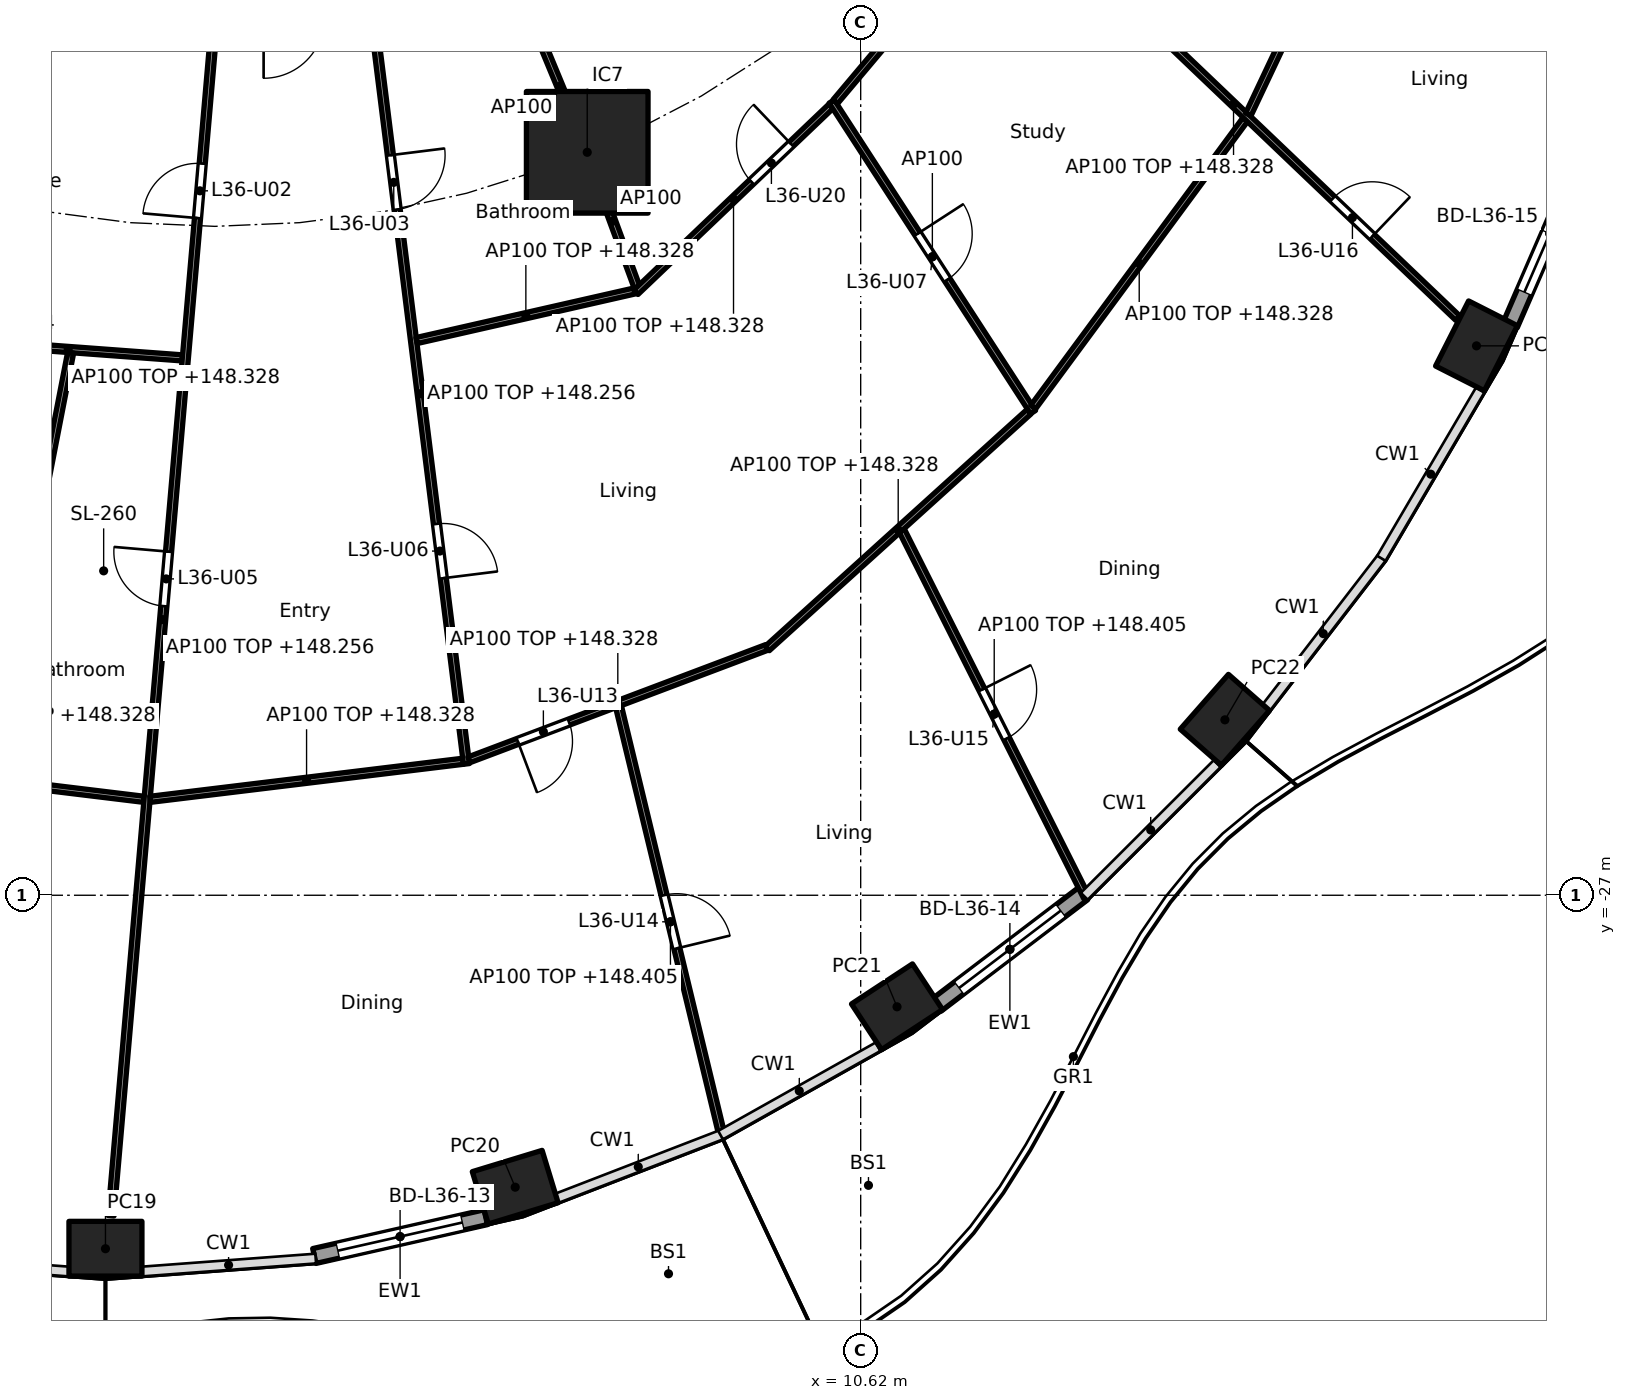
"""IFC4 building model, lengths in metres.
Left out: names, types, materials, properties, quantities, classifications, styles, units other than length and angle.
Written with IfcOpenShell. Run it as: python <this file> out.ifc"""

import sys

from ifc_helpers import new_model, si_unit, direction, frame, frame_2d, origin, origin_2d, place, context, subcontext, project, spatial, rectangle, hollow_rectangle, extrude, element, fill, save


model = new_model("IFC4")
c1 = context("Model", 3, precision=1e-05, world=origin(), true_north=direction((0.0, 1.0)))
c2 = subcontext(c1, "Body", "Model", "MODEL_VIEW")
j1 = project(units=[si_unit("LENGTHUNIT", "METRE"), si_unit("PLANEANGLEUNIT", "RADIAN")], contexts=[c1])
p1 = place(None, origin())
s1 = spatial("IfcSite", under=j1, at=p1, CompositionType="ELEMENT")
p2 = place(p1, origin())
s2 = spatial("IfcBuilding", under=s1, at=p2, CompositionType="ELEMENT")
p3 = place(p2, frame((0.0, 0.0, 145.5)))
s3 = spatial("IfcBuildingStorey", under=s2, at=p3, CompositionType="ELEMENT", Elevation=145.5)
for number, where, z_axis, x_axis in (
    (1, (-1.8, -32.813, 0.0), (0.0, 0.0, 1.0), (1.0, 0.0, 0.0)),
    (2, (4.938, -31.801, 0.0), (0.0, 0.0, 1.0), (0.957, 0.292, 0.0)),
    (3, (11.218, -28.834, 0.0), (0.0, 0.0, 1.0), (0.836, 0.549, 0.0)),
    (4, (16.61, -24.115, 0.0), (0.0, 0.0, 1.0), (0.66, 0.751, 0.0)),
    (5, (20.747, -17.965, 0.0), (0.0, 0.0, 1.0), (0.452, 0.892, 0.0)),
):
    element("IfcColumn", number, at=place(p3, frame(where, z_axis=z_axis, x_axis=x_axis)), inside=s3, PredefinedType="COLUMN", context=c2, shape_type="SweptSolid", body=[
        extrude(hollow_rectangle(XDim=1.2, YDim=0.9, WallThickness=0.04, at=origin_2d()), origin(), (0.0, 0.0, 1.0), 3.7),
    ])
p4 = place(p3, frame((6.123, -14.782, 0.0), z_axis=(0.0, 0.0, 1.0), x_axis=(1.0, 0.0, 0.0)))
e6 = element("IfcColumn", 6, at=p4, inside=s3, PredefinedType="COLUMN", context=c2, shape_type="SweptSolid", body=[
    extrude(rectangle(XDim=2.0, YDim=2.0, at=origin_2d()), origin(), (0.0, 0.0, 1.0), 3.7),
])
p5 = place(p3, frame((4.455, -32.294, 0.0), z_axis=(0.0, 0.0, 1.0), x_axis=(-0.975339035722, -0.220711951186, 0.0)))
e7 = element("IfcWall", 7, at=p5, inside=s3, PredefinedType="SOLIDWALL", context=c2, shape_type="SweptSolid", body=[
    extrude(rectangle(XDim=2.89, YDim=0.25, at=frame_2d((1.445, 0.0))), origin(), (0.0, 0.0, 1.0), 3.44),
])
p6 = place(p5, frame((0.395, 0.0, 0.0)))
e8 = element("IfcOpeningElement", 8, at=p6, cuts=e7, PredefinedType="OPENING", context=c2, shape_type="SweptSolid", body=[
    extrude(rectangle(XDim=2.1, YDim=2.4, at=frame_2d((1.05, 1.2))), frame((0.0, 0.135, 0.0), z_axis=(0.0, -1.0, 0.0), x_axis=(1.0, 0.0, 0.0)), (0.0, 0.0, 1.0), 0.27),
])
p7 = place(p3, frame((14.278, -26.973, 0.0), z_axis=(0.0, 0.0, 1.0), x_axis=(-0.796022231079, -0.605267385233, 0.0)))
e9 = element("IfcWall", 9, at=p7, inside=s3, PredefinedType="SOLIDWALL", context=c2, shape_type="SweptSolid", body=[
    extrude(rectangle(XDim=3.026, YDim=0.25, at=frame_2d((1.513, 0.0))), origin(), (0.0, 0.0, 1.0), 3.44),
])
p8 = place(p7, frame((0.463, 0.0, 0.0)))
e10 = element("IfcOpeningElement", 10, at=p8, cuts=e9, PredefinedType="OPENING", context=c2, shape_type="SweptSolid", body=[
    extrude(rectangle(XDim=2.1, YDim=2.4, at=frame_2d((1.05, 1.2))), frame((0.0, 0.135, 0.0), z_axis=(0.0, -1.0, 0.0), x_axis=(1.0, 0.0, 0.0)), (0.0, 0.0, 1.0), 0.27),
])
p9 = place(p3, frame((22.6, -14.623, 0.0), z_axis=(0.0, 0.0, 1.0), x_axis=(-0.397575919276, -0.917569282622, 0.0)))
e11 = element("IfcWall", 11, at=p9, inside=s3, PredefinedType="SOLIDWALL", context=c2, shape_type="SweptSolid", body=[
    extrude(rectangle(XDim=3.261, YDim=0.25, at=frame_2d((1.63, 0.0))), origin(), (0.0, 0.0, 1.0), 3.44),
])
p10 = place(p9, frame((0.58, 0.0, 0.0)))
e12 = element("IfcOpeningElement", 12, at=p10, cuts=e11, PredefinedType="OPENING", context=c2, shape_type="SweptSolid", body=[
    extrude(rectangle(XDim=2.1, YDim=2.4, at=frame_2d((1.05, 1.2))), frame((0.0, 0.135, 0.0), z_axis=(0.0, -1.0, 0.0), x_axis=(1.0, 0.0, 0.0)), (0.0, 0.0, 1.0), 0.27),
])
p11 = place(p3, frame((-4.29, -17.885, 0.0), z_axis=(0.0, 0.0, 1.0), x_axis=(0.997272353708, -0.073809569363, 0.0)))
e13 = element("IfcWall", 13, at=p11, inside=s3, PredefinedType="PARTITIONING", context=c2, shape_type="SweptSolid", body=[
    extrude(rectangle(XDim=3.764, YDim=0.1, at=frame_2d((1.882, 0.0))), origin(), (0.0, 0.0, 1.0), 2.828),
])
p12 = place(p11, frame((0.541, 0.0, 0.0)))
e14 = element("IfcOpeningElement", 14, at=p12, cuts=e13, PredefinedType="OPENING", context=c2, shape_type="SweptSolid", body=[
    extrude(rectangle(XDim=0.9, YDim=2.1, at=frame_2d((0.45, 1.05))), frame((0.0, 0.06, 0.0), z_axis=(0.0, -1.0, 0.0), x_axis=(1.0, 0.0, 0.0)), (0.0, 0.0, 1.0), 0.12),
])
p13 = place(p3, frame((-6.313, -24.797, 0.0), z_axis=(0.0, 0.0, 1.0), x_axis=(0.992692993044, -0.120667400577, 0.0)))
e15 = element("IfcWall", 15, at=p13, inside=s3, PredefinedType="PARTITIONING", context=c2, shape_type="SweptSolid", body=[
    extrude(rectangle(XDim=5.186, YDim=0.1, at=frame_2d((2.593, 0.0))), origin(), (0.0, 0.0, 1.0), 2.828),
])
p14 = place(p3, frame((-2.373, -18.077, 0.0), z_axis=(0.0, 0.0, 1.0), x_axis=(-0.190800770119, -0.98162878224, 0.0)))
e16 = element("IfcWall", 16, at=p14, inside=s3, PredefinedType="PARTITIONING", context=c2, shape_type="SweptSolid", body=[
    extrude(rectangle(XDim=7.114, YDim=0.1, at=frame_2d((3.557, 0.0))), origin(), (0.0, 0.0, 1.0), 3.44),
])
p15 = place(p3, frame((-0.009, -12.664, 0.0), z_axis=(0.0, 0.0, 1.0), x_axis=(-0.086431005932, -0.996257838721, 0.0)))
e17 = element("IfcWall", 17, at=p15, inside=s3, PredefinedType="PARTITIONING", context=c2, shape_type="SweptSolid", body=[
    extrude(rectangle(XDim=19.68, YDim=0.1, at=frame_2d((9.84, 0.0))), origin(), (0.0, 0.0, 1.0), 2.756),
])
p16 = place(p15, frame((2.312, 0.0, 0.0)))
e18 = element("IfcOpeningElement", 18, at=p16, cuts=e17, PredefinedType="OPENING", context=c2, shape_type="SweptSolid", body=[
    extrude(rectangle(XDim=0.9, YDim=2.1, at=frame_2d((0.45, 1.05))), frame((0.0, 0.06, 0.0), z_axis=(0.0, -1.0, 0.0), x_axis=(1.0, 0.0, 0.0)), (0.0, 0.0, 1.0), 0.12),
])
p17 = place(p15, frame((8.718, 0.0, 0.0)))
e19 = element("IfcOpeningElement", 19, at=p17, cuts=e17, PredefinedType="OPENING", context=c2, shape_type="SweptSolid", body=[
    extrude(rectangle(XDim=0.9, YDim=2.1, at=frame_2d((0.45, 1.05))), frame((0.0, 0.06, 0.0), z_axis=(0.0, -1.0, 0.0), x_axis=(1.0, 0.0, 0.0)), (0.0, 0.0, 1.0), 0.12),
])
p18 = place(p3, frame((-1.066, -25.422, 0.0), z_axis=(0.0, 0.0, 1.0), x_axis=(0.992692993044, 0.120667400577, 0.0)))
e20 = element("IfcWall", 20, at=p18, inside=s3, PredefinedType="PARTITIONING", context=c2, shape_type="SweptSolid", body=[
    extrude(rectangle(XDim=5.186, YDim=0.1, at=frame_2d((2.593, 0.0))), origin(), (0.0, 0.0, 1.0), 2.828),
])
p19 = place(p3, frame((2.615, -12.664, 0.0), z_axis=(0.0, 0.0, 1.0), x_axis=(0.124051875784, -0.992275733914, 0.0)))
e21 = element("IfcWall", 21, at=p19, inside=s3, PredefinedType="PARTITIONING", context=c2, shape_type="SweptSolid", body=[
    extrude(rectangle(XDim=12.271, YDim=0.1, at=frame_2d((6.135, 0.0))), origin(), (0.0, 0.0, 1.0), 2.756),
])
p20 = place(p19, frame((2.183, 0.0, 0.0)))
e22 = element("IfcOpeningElement", 22, at=p20, cuts=e21, PredefinedType="OPENING", context=c2, shape_type="SweptSolid", body=[
    extrude(rectangle(XDim=0.9, YDim=2.1, at=frame_2d((0.45, 1.05))), frame((0.0, 0.06, 0.0), z_axis=(0.0, -1.0, 0.0), x_axis=(1.0, 0.0, 0.0)), (0.0, 0.0, 1.0), 0.12),
])
p21 = place(p19, frame((8.293, 0.0, 0.0)))
e23 = element("IfcOpeningElement", 23, at=p21, cuts=e21, PredefinedType="OPENING", context=c2, shape_type="SweptSolid", body=[
    extrude(rectangle(XDim=0.9, YDim=2.1, at=frame_2d((0.45, 1.05))), frame((0.0, 0.06, 0.0), z_axis=(0.0, -1.0, 0.0), x_axis=(1.0, 0.0, 0.0)), (0.0, 0.0, 1.0), 0.12),
])
p22 = place(p3, frame((3.317, -17.878, 0.0), z_axis=(0.0, 0.0, 1.0), x_axis=(0.975099660451, 0.221767112505, 0.0)))
e24 = element("IfcWall", 24, at=p22, inside=s3, PredefinedType="PARTITIONING", context=c2, shape_type="SweptSolid", body=[
    extrude(rectangle(XDim=3.686, YDim=0.1, at=frame_2d((1.843, 0.0))), origin(), (0.0, 0.0, 1.0), 2.828),
])
p23 = place(p3, frame((4.178, -24.773, 0.0), z_axis=(0.0, 0.0, 1.0), x_axis=(0.935585145124, 0.353101169955, 0.0)))
e25 = element("IfcWall", 25, at=p23, inside=s3, PredefinedType="PARTITIONING", context=c2, shape_type="SweptSolid", body=[
    extrude(rectangle(XDim=5.233, YDim=0.1, at=frame_2d((2.617, 0.0))), origin(), (0.0, 0.0, 1.0), 2.828),
])
p24 = place(p23, frame((0.858, 0.0, 0.0)))
e26 = element("IfcOpeningElement", 26, at=p24, cuts=e25, PredefinedType="OPENING", context=c2, shape_type="SweptSolid", body=[
    extrude(rectangle(XDim=0.9, YDim=2.1, at=frame_2d((0.45, 1.05))), frame((0.0, 0.06, 0.0), z_axis=(0.0, -1.0, 0.0), x_axis=(1.0, 0.0, 0.0)), (0.0, 0.0, 1.0), 0.12),
])
p25 = place(p3, frame((6.638, -23.897, 0.0), z_axis=(0.0, 0.0, 1.0), x_axis=(0.23451925277, -0.97211147513, 0.0)))
e27 = element("IfcWall", 27, at=p25, inside=s3, PredefinedType="PARTITIONING", context=c2, shape_type="SweptSolid", body=[
    extrude(rectangle(XDim=7.281, YDim=0.1, at=frame_2d((3.641, 0.0))), origin(), (0.0, 0.0, 1.0), 2.905),
])
p26 = place(p25, frame((3.19, 0.0, 0.0)))
e28 = element("IfcOpeningElement", 28, at=p26, cuts=e27, PredefinedType="OPENING", context=c2, shape_type="SweptSolid", body=[
    extrude(rectangle(XDim=0.9, YDim=2.1, at=frame_2d((0.45, 1.05))), frame((0.0, 0.06, 0.0), z_axis=(0.0, -1.0, 0.0), x_axis=(1.0, 0.0, 0.0)), (0.0, 0.0, 1.0), 0.12),
])
p27 = place(p3, frame((5.243, -12.657, 0.0), z_axis=(0.0, 0.0, 1.0), x_axis=(0.382703272338, -0.923871314276, 0.0)))
e29 = element("IfcWall", 29, at=p27, inside=s3, PredefinedType="PARTITIONING", context=c2, shape_type="SweptSolid", body=[
    extrude(rectangle(XDim=2.249, YDim=0.1, at=frame_2d((1.125, 0.0))), origin(), (0.0, 0.0, 1.0), 3.44),
])
p28 = place(p3, frame((6.14, -14.829, 0.0), z_axis=(0.0, 0.0, 1.0), x_axis=(0.346198576881, -0.938161257655, 0.0)))
e30 = element("IfcWall", 30, at=p28, inside=s3, PredefinedType="PARTITIONING", context=c2, shape_type="SweptSolid", body=[
    extrude(rectangle(XDim=2.317, YDim=0.1, at=frame_2d((1.158, 0.0))), origin(), (0.0, 0.0, 1.0), 3.44),
])
p29 = place(p3, frame((6.923, -17.084, 0.0), z_axis=(0.0, 0.0, 1.0), x_axis=(0.723719008606, 0.690094773623, 0.0)))
e31 = element("IfcWall", 31, at=p29, inside=s3, PredefinedType="PARTITIONING", context=c2, shape_type="SweptSolid", body=[
    extrude(rectangle(XDim=4.436, YDim=0.1, at=frame_2d((2.218, 0.0))), origin(), (0.0, 0.0, 1.0), 2.828),
])
p30 = place(p29, frame((2.629, 0.0, 0.0)))
e32 = element("IfcOpeningElement", 32, at=p30, cuts=e31, PredefinedType="OPENING", context=c2, shape_type="SweptSolid", body=[
    extrude(rectangle(XDim=0.9, YDim=2.1, at=frame_2d((0.45, 1.05))), frame((0.0, 0.06, 0.0), z_axis=(0.0, -1.0, 0.0), x_axis=(1.0, 0.0, 0.0)), (0.0, 0.0, 1.0), 0.12),
])
p31 = place(p3, frame((9.084, -22.941, 0.0), z_axis=(0.0, 0.0, 1.0), x_axis=(0.741684187175, 0.670749257543, 0.0)))
e33 = element("IfcWall", 33, at=p31, inside=s3, PredefinedType="PARTITIONING", context=c2, shape_type="SweptSolid", body=[
    extrude(rectangle(XDim=5.806, YDim=0.1, at=frame_2d((2.903, 0.0))), origin(), (0.0, 0.0, 1.0), 2.828),
])
p32 = place(p3, frame((11.296, -21.005, 0.0), z_axis=(0.0, 0.0, 1.0), x_axis=(0.44991509116, -0.893071335755, 0.0)))
e34 = element("IfcWall", 34, at=p32, inside=s3, PredefinedType="PARTITIONING", context=c2, shape_type="SweptSolid", body=[
    extrude(rectangle(XDim=6.755, YDim=0.1, at=frame_2d((3.377, 0.0))), origin(), (0.0, 0.0, 1.0), 2.905),
])
p33 = place(p32, frame((2.927, 0.0, 0.0)))
e35 = element("IfcOpeningElement", 35, at=p33, cuts=e34, PredefinedType="OPENING", context=c2, shape_type="SweptSolid", body=[
    extrude(rectangle(XDim=0.9, YDim=2.1, at=frame_2d((0.45, 1.05))), frame((0.0, 0.06, 0.0), z_axis=(0.0, -1.0, 0.0), x_axis=(1.0, 0.0, 0.0)), (0.0, 0.0, 1.0), 0.12),
])
p34 = place(p3, frame((10.143, -13.946, 0.0), z_axis=(0.0, 0.0, 1.0), x_axis=(0.543872968754, -0.839167560061, 0.0)))
e36 = element("IfcWall", 36, at=p34, inside=s3, PredefinedType="PARTITIONING", context=c2, shape_type="SweptSolid", body=[
    extrude(rectangle(XDim=6.088, YDim=0.1, at=frame_2d((3.044, 0.0))), origin(), (0.0, 0.0, 1.0), 3.44),
])
p35 = place(p34, frame((2.594, 0.0, 0.0)))
e37 = element("IfcOpeningElement", 37, at=p35, cuts=e36, PredefinedType="OPENING", context=c2, shape_type="SweptSolid", body=[
    extrude(rectangle(XDim=0.9, YDim=2.1, at=frame_2d((0.45, 1.05))), frame((0.0, 0.06, 0.0), z_axis=(0.0, -1.0, 0.0), x_axis=(1.0, 0.0, 0.0)), (0.0, 0.0, 1.0), 0.12),
])
p36 = place(p3, frame((10.202, -13.95, 0.0), z_axis=(0.0, 0.0, 1.0), x_axis=(0.644068144287, 0.764968120587, 0.0)))
e38 = element("IfcWall", 38, at=p36, inside=s3, PredefinedType="PARTITIONING", context=c2, shape_type="SweptSolid", body=[
    extrude(rectangle(XDim=4.449, YDim=0.1, at=frame_2d((2.224, 0.0))), origin(), (0.0, 0.0, 1.0), 2.828),
])
p37 = place(p3, frame((13.457, -18.973, 0.0), z_axis=(0.0, 0.0, 1.0), x_axis=(0.593532053206, 0.80481035146, 0.0)))
e39 = element("IfcWall", 39, at=p37, inside=s3, PredefinedType="PARTITIONING", context=c2, shape_type="SweptSolid", body=[
    extrude(rectangle(XDim=5.876, YDim=0.1, at=frame_2d((2.938, 0.0))), origin(), (0.0, 0.0, 1.0), 2.828),
])
p38 = place(p3, frame((13.064, -10.474, 0.0), z_axis=(0.0, 0.0, 1.0), x_axis=(0.723627371706, -0.690190862673, 0.0)))
e40 = element("IfcWall", 40, at=p38, inside=s3, PredefinedType="PARTITIONING", context=c2, shape_type="SweptSolid", body=[
    extrude(rectangle(XDim=10.193, YDim=0.1, at=frame_2d((5.097, 0.0))), origin(), (0.0, 0.0, 1.0), 2.828),
])
p39 = place(p38, frame((2.277, 0.0, 0.0)))
e41 = element("IfcOpeningElement", 41, at=p39, cuts=e40, PredefinedType="OPENING", context=c2, shape_type="SweptSolid", body=[
    extrude(rectangle(XDim=0.9, YDim=2.1, at=frame_2d((0.45, 1.05))), frame((0.0, 0.06, 0.0), z_axis=(0.0, -1.0, 0.0), x_axis=(1.0, 0.0, 0.0)), (0.0, 0.0, 1.0), 0.12),
])
p40 = place(p38, frame((7.348, 0.0, 0.0)))
e42 = element("IfcOpeningElement", 42, at=p40, cuts=e40, PredefinedType="OPENING", context=c2, shape_type="SweptSolid", body=[
    extrude(rectangle(XDim=0.9, YDim=2.1, at=frame_2d((0.45, 1.05))), frame((0.0, 0.06, 0.0), z_axis=(0.0, -1.0, 0.0), x_axis=(1.0, 0.0, 0.0)), (0.0, 0.0, 1.0), 0.12),
])
p41 = place(p3, frame((16.995, -14.158, 0.0), z_axis=(0.0, 0.0, 1.0), x_axis=(0.427456178439, 0.904036069808, 0.0)))
e43 = element("IfcWall", 43, at=p41, inside=s3, PredefinedType="PARTITIONING", context=c2, shape_type="SweptSolid", body=[
    extrude(rectangle(XDim=6.113, YDim=0.1, at=frame_2d((3.057, 0.0))), origin(), (0.0, 0.0, 1.0), 2.828),
])
p42 = place(p6, origin())
e44 = element("IfcDoor", 44, at=p42, inside=s3, OperationType="SLIDING_TO_LEFT", PredefinedType="DOOR", context=c2, shape_type="SweptSolid", body=[
    extrude(rectangle(XDim=2.1, YDim=2.4, at=frame_2d((1.05, 1.2))), frame((0.0, 0.025, 0.0), z_axis=(0.0, -1.0, 0.0), x_axis=(1.0, 0.0, 0.0)), (0.0, 0.0, 1.0), 0.05),
])
fill(e8, e44)
p43 = place(p8, origin())
e45 = element("IfcDoor", 45, at=p43, inside=s3, OperationType="SLIDING_TO_LEFT", PredefinedType="DOOR", context=c2, shape_type="SweptSolid", body=[
    extrude(rectangle(XDim=2.1, YDim=2.4, at=frame_2d((1.05, 1.2))), frame((0.0, 0.025, 0.0), z_axis=(0.0, -1.0, 0.0), x_axis=(1.0, 0.0, 0.0)), (0.0, 0.0, 1.0), 0.05),
])
fill(e10, e45)
p44 = place(p10, origin())
e46 = element("IfcDoor", 46, at=p44, inside=s3, OperationType="SLIDING_TO_LEFT", PredefinedType="DOOR", context=c2, shape_type="SweptSolid", body=[
    extrude(rectangle(XDim=2.1, YDim=2.4, at=frame_2d((1.05, 1.2))), frame((0.0, 0.025, 0.0), z_axis=(0.0, -1.0, 0.0), x_axis=(1.0, 0.0, 0.0)), (0.0, 0.0, 1.0), 0.05),
])
fill(e12, e46)
p45 = place(p16, frame((0.9, 0.0, 0.0), x_axis=(-1.0, 0.0, 0.0)))
e47 = element("IfcDoor", 47, at=p45, inside=s3, OperationType="SINGLE_SWING_LEFT", PredefinedType="DOOR", context=c2, shape_type="SweptSolid", body=[
    extrude(rectangle(XDim=0.9, YDim=2.1, at=frame_2d((0.45, 1.05))), frame((0.0, 0.025, 0.0), z_axis=(0.0, -1.0, 0.0), x_axis=(1.0, 0.0, 0.0)), (0.0, 0.0, 1.0), 0.05),
])
fill(e18, e47)
p46 = place(p20, origin())
e48 = element("IfcDoor", 48, at=p46, inside=s3, OperationType="SINGLE_SWING_LEFT", PredefinedType="DOOR", context=c2, shape_type="SweptSolid", body=[
    extrude(rectangle(XDim=0.9, YDim=2.1, at=frame_2d((0.45, 1.05))), frame((0.0, 0.025, 0.0), z_axis=(0.0, -1.0, 0.0), x_axis=(1.0, 0.0, 0.0)), (0.0, 0.0, 1.0), 0.05),
])
fill(e22, e48)
p47 = place(p17, frame((0.9, 0.0, 0.0), x_axis=(-1.0, 0.0, 0.0)))
e49 = element("IfcDoor", 49, at=p47, inside=s3, OperationType="SINGLE_SWING_RIGHT", PredefinedType="DOOR", context=c2, shape_type="SweptSolid", body=[
    extrude(rectangle(XDim=0.9, YDim=2.1, at=frame_2d((0.45, 1.05))), frame((0.0, 0.025, 0.0), z_axis=(0.0, -1.0, 0.0), x_axis=(1.0, 0.0, 0.0)), (0.0, 0.0, 1.0), 0.05),
])
fill(e19, e49)
p48 = place(p21, origin())
e50 = element("IfcDoor", 50, at=p48, inside=s3, OperationType="SINGLE_SWING_RIGHT", PredefinedType="DOOR", context=c2, shape_type="SweptSolid", body=[
    extrude(rectangle(XDim=0.9, YDim=2.1, at=frame_2d((0.45, 1.05))), frame((0.0, 0.025, 0.0), z_axis=(0.0, -1.0, 0.0), x_axis=(1.0, 0.0, 0.0)), (0.0, 0.0, 1.0), 0.05),
])
fill(e23, e50)
p49 = place(p35, origin())
e51 = element("IfcDoor", 51, at=p49, inside=s3, OperationType="SINGLE_SWING_LEFT", PredefinedType="DOOR", context=c2, shape_type="SweptSolid", body=[
    extrude(rectangle(XDim=0.9, YDim=2.1, at=frame_2d((0.45, 1.05))), frame((0.0, 0.025, 0.0), z_axis=(0.0, -1.0, 0.0), x_axis=(1.0, 0.0, 0.0)), (0.0, 0.0, 1.0), 0.05),
])
fill(e37, e51)
p50 = place(p24, frame((0.9, 0.0, 0.0), x_axis=(-1.0, 0.0, 0.0)))
e52 = element("IfcDoor", 52, at=p50, inside=s3, OperationType="SINGLE_SWING_RIGHT", PredefinedType="DOOR", context=c2, shape_type="SweptSolid", body=[
    extrude(rectangle(XDim=0.9, YDim=2.1, at=frame_2d((0.45, 1.05))), frame((0.0, 0.025, 0.0), z_axis=(0.0, -1.0, 0.0), x_axis=(1.0, 0.0, 0.0)), (0.0, 0.0, 1.0), 0.05),
])
fill(e26, e52)
p51 = place(p26, origin())
e53 = element("IfcDoor", 53, at=p51, inside=s3, OperationType="SINGLE_SWING_RIGHT", PredefinedType="DOOR", context=c2, shape_type="SweptSolid", body=[
    extrude(rectangle(XDim=0.9, YDim=2.1, at=frame_2d((0.45, 1.05))), frame((0.0, 0.025, 0.0), z_axis=(0.0, -1.0, 0.0), x_axis=(1.0, 0.0, 0.0)), (0.0, 0.0, 1.0), 0.05),
])
fill(e28, e53)
p52 = place(p33, origin())
e54 = element("IfcDoor", 54, at=p52, inside=s3, OperationType="SINGLE_SWING_LEFT", PredefinedType="DOOR", context=c2, shape_type="SweptSolid", body=[
    extrude(rectangle(XDim=0.9, YDim=2.1, at=frame_2d((0.45, 1.05))), frame((0.0, 0.025, 0.0), z_axis=(0.0, -1.0, 0.0), x_axis=(1.0, 0.0, 0.0)), (0.0, 0.0, 1.0), 0.05),
])
fill(e35, e54)
p53 = place(p40, origin())
e55 = element("IfcDoor", 55, at=p53, inside=s3, OperationType="SINGLE_SWING_RIGHT", PredefinedType="DOOR", context=c2, shape_type="SweptSolid", body=[
    extrude(rectangle(XDim=0.9, YDim=2.1, at=frame_2d((0.45, 1.05))), frame((0.0, 0.025, 0.0), z_axis=(0.0, -1.0, 0.0), x_axis=(1.0, 0.0, 0.0)), (0.0, 0.0, 1.0), 0.05),
])
fill(e42, e55)
p54 = place(p30, origin())
e56 = element("IfcDoor", 56, at=p54, inside=s3, OperationType="SINGLE_SWING_RIGHT", PredefinedType="DOOR", context=c2, shape_type="SweptSolid", body=[
    extrude(rectangle(XDim=0.9, YDim=2.1, at=frame_2d((0.45, 1.05))), frame((0.0, 0.025, 0.0), z_axis=(0.0, -1.0, 0.0), x_axis=(1.0, 0.0, 0.0)), (0.0, 0.0, 1.0), 0.05),
])
fill(e32, e56)
save(model, sys.argv[1])
